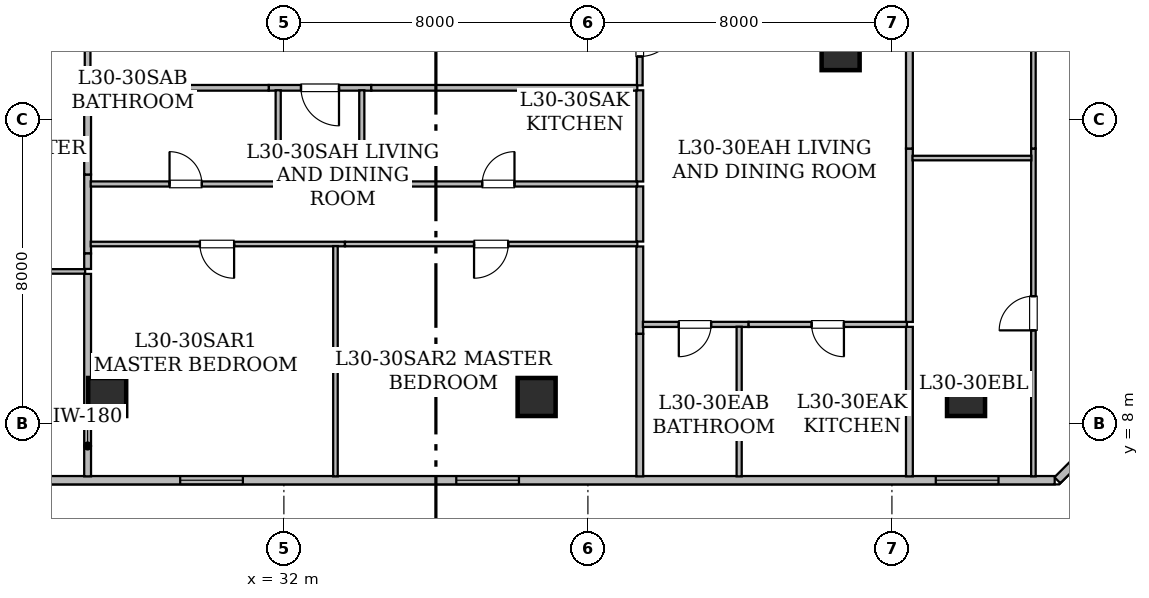
"""IFC4 building model, lengths in metres.
Left out: names, types, materials, properties, quantities, classifications, styles, units other than length and angle.
Written with IfcOpenShell. Run it as: python <this file> out.ifc"""

import sys

from ifc_helpers import new_model, si_unit, direction, frame, frame_2d, origin, origin_2d, place, context, subcontext, project, spatial, rectangle, hollow_rectangle, extrude, element, fill, save


model = new_model("IFC4")
c1 = context("Model", 3, precision=1e-05, world=origin(), true_north=direction((0.0, 1.0)))
c2 = subcontext(c1, "Body", "Model", "MODEL_VIEW")
j1 = project(units=[si_unit("LENGTHUNIT", "METRE"), si_unit("PLANEANGLEUNIT", "RADIAN")], contexts=[c1])
p1 = place(None, origin())
s1 = spatial("IfcSite", under=j1, at=p1, CompositionType="ELEMENT")
p2 = place(p1, origin())
s2 = spatial("IfcBuilding", under=s1, at=p2, CompositionType="ELEMENT")
p3 = place(p2, frame((0.0, 0.0, 120.15)))
s3 = spatial("IfcBuildingStorey", under=s2, at=p3, CompositionType="ELEMENT", Elevation=120.15)
for number, where, z_axis, x_axis in (
    (1, (27.35, 8.7, 0.0), (0.0, 0.0, 1.0), (1.0, 0.0, 0.0)),
    (2, (38.65, 8.7, 0.0), (0.0, 0.0, 1.0), (1.0, 0.0, 0.0)),
    (3, (49.95, 8.7, 0.0), (0.0, 0.0, 1.0), (1.0, 0.0, 0.0)),
    (4, (46.65, 17.8, 0.0), (0.0, 0.0, 1.0), (1.0, 0.0, 0.0)),
):
    element("IfcColumn", number, at=place(p3, frame(where, z_axis=z_axis, x_axis=x_axis)), inside=s3, PredefinedType="COLUMN", context=c2, shape_type="SweptSolid", body=[
        extrude(hollow_rectangle(XDim=1.0, YDim=1.0, WallThickness=0.05, at=origin_2d()), origin(), (0.0, 0.0, 1.0), 3.65),
    ])
p4 = place(p3, frame((56.44, 10.596, 0.0), z_axis=(0.0, 0.0, 1.0), x_axis=(-0.707106781187, -0.707106781187, 0.0)))
e5 = element("IfcWall", 5, at=p4, inside=s3, PredefinedType="STANDARD", context=c2, shape_type="SweptSolid", body=[
    extrude(rectangle(XDim=5.778, YDim=0.22, at=frame_2d((2.889, 0.0))), origin(), (0.0, 0.0, 1.0), 3.43),
])
p5 = place(p3, frame((52.283, 6.51, 0.0), z_axis=(0.0, 0.0, 1.0), x_axis=(-1.0, 0.0, 0.0)))
e6 = element("IfcWall", 6, at=p5, inside=s3, PredefinedType="STANDARD", context=c2, shape_type="SweptSolid", body=[
    extrude(rectangle(XDim=38.568, YDim=0.22, at=frame_2d((19.284, 0.0))), origin(), (0.0, 0.0, 1.0), 3.43),
])
p6 = place(p5, frame((35.53, 0.0, 0.85)))
e7 = element("IfcOpeningElement", 7, at=p6, cuts=e6, PredefinedType="OPENING", context=c2, shape_type="SweptSolid", body=[
    extrude(rectangle(XDim=1.65, YDim=1.55, at=frame_2d((0.825, 0.775))), frame((0.0, 0.12, 0.0), z_axis=(0.0, -1.0, 0.0), x_axis=(1.0, 0.0, 0.0)), (0.0, 0.0, 1.0), 0.24),
])
p7 = place(p5, frame((28.578, 0.0, 0.85)))
e8 = element("IfcOpeningElement", 8, at=p7, cuts=e6, PredefinedType="OPENING", context=c2, shape_type="SweptSolid", body=[
    extrude(rectangle(XDim=1.65, YDim=1.55, at=frame_2d((0.825, 0.775))), frame((0.0, 0.12, 0.0), z_axis=(0.0, -1.0, 0.0), x_axis=(1.0, 0.0, 0.0)), (0.0, 0.0, 1.0), 0.24),
])
p8 = place(p5, frame((21.362, 0.0, 0.85)))
e9 = element("IfcOpeningElement", 9, at=p8, cuts=e6, PredefinedType="OPENING", context=c2, shape_type="SweptSolid", body=[
    extrude(rectangle(XDim=1.65, YDim=1.55, at=frame_2d((0.825, 0.775))), frame((0.0, 0.12, 0.0), z_axis=(0.0, -1.0, 0.0), x_axis=(1.0, 0.0, 0.0)), (0.0, 0.0, 1.0), 0.24),
])
p9 = place(p5, frame((14.097, 0.0, 0.85)))
e10 = element("IfcOpeningElement", 10, at=p9, cuts=e6, PredefinedType="OPENING", context=c2, shape_type="SweptSolid", body=[
    extrude(rectangle(XDim=1.65, YDim=1.55, at=frame_2d((0.825, 0.775))), frame((0.0, 0.12, 0.0), z_axis=(0.0, -1.0, 0.0), x_axis=(1.0, 0.0, 0.0)), (0.0, 0.0, 1.0), 0.24),
])
p10 = place(p5, frame((1.479, 0.0, 0.85)))
e11 = element("IfcOpeningElement", 11, at=p10, cuts=e6, PredefinedType="OPENING", context=c2, shape_type="SweptSolid", body=[
    extrude(rectangle(XDim=1.65, YDim=1.55, at=frame_2d((0.825, 0.775))), frame((0.0, 0.12, 0.0), z_axis=(0.0, -1.0, 0.0), x_axis=(1.0, 0.0, 0.0)), (0.0, 0.0, 1.0), 0.24),
])
p11 = place(p3, frame((26.835, 16.9, 0.0), z_axis=(0.0, 0.0, 1.0), x_axis=(0.0, 1.0, 0.0)))
e12 = element("IfcWall", 12, at=p11, inside=s3, PredefinedType="STANDARD", context=c2, shape_type="SweptSolid", body=[
    extrude(rectangle(XDim=1.254, YDim=0.15, at=frame_2d((0.627, 0.0))), origin(), (0.0, 0.0, 1.0), 3.43),
])
p12 = place(p3, frame((34.299, 16.835, 0.0), z_axis=(0.0, 0.0, 1.0), x_axis=(-1.0, 0.0, 0.0)))
e13 = element("IfcWall", 13, at=p12, inside=s3, PredefinedType="STANDARD", context=c2, shape_type="SweptSolid", body=[
    extrude(rectangle(XDim=2.698, YDim=0.15, at=frame_2d((1.349, 0.0))), origin(), (0.0, 0.0, 1.0), 3.43),
])
p13 = place(p12, frame((0.849, 0.0, 0.0)))
e14 = element("IfcOpeningElement", 14, at=p13, cuts=e13, PredefinedType="OPENING", context=c2, shape_type="SweptSolid", body=[
    extrude(rectangle(XDim=1.0, YDim=2.15, at=frame_2d((0.5, 1.075))), frame((0.0, 0.085, 0.0), z_axis=(0.0, -1.0, 0.0), x_axis=(1.0, 0.0, 0.0)), (0.0, 0.0, 1.0), 0.17),
])
p14 = place(p3, frame((31.601, 16.835, 0.0), z_axis=(0.0, 0.0, 1.0), x_axis=(-1.0, 0.0, 0.0)))
e15 = element("IfcWall", 15, at=p14, inside=s3, PredefinedType="STANDARD", context=c2, shape_type="SweptSolid", body=[
    extrude(rectangle(XDim=4.701, YDim=0.15, at=frame_2d((2.351, 0.0))), origin(), (0.0, 0.0, 1.0), 2.647),
])
p15 = place(p3, frame((41.3, 16.835, 0.0), z_axis=(0.0, 0.0, 1.0), x_axis=(-1.0, 0.0, 0.0)))
e16 = element("IfcWall", 16, at=p15, inside=s3, PredefinedType="STANDARD", context=c2, shape_type="SweptSolid", body=[
    extrude(rectangle(XDim=7.001, YDim=0.15, at=frame_2d((3.5, 0.0))), origin(), (0.0, 0.0, 1.0), 2.647),
])
p16 = place(p3, frame((41.365, 19.459, 0.0), z_axis=(0.0, 0.0, 1.0), x_axis=(0.0, -1.0, 0.0)))
e17 = element("IfcWall", 17, at=p16, inside=s3, PredefinedType="STANDARD", context=c2, shape_type="SweptSolid", body=[
    extrude(rectangle(XDim=2.559, YDim=0.15, at=frame_2d((1.28, 0.0))), origin(), (0.0, 0.0, 1.0), 2.647),
])
p17 = place(p16, frame((0.8, 0.0, 0.0)))
e18 = element("IfcOpeningElement", 18, at=p17, cuts=e17, PredefinedType="OPENING", context=c2, shape_type="SweptSolid", body=[
    extrude(rectangle(XDim=1.0, YDim=2.15, at=frame_2d((0.5, 1.075))), frame((0.0, 0.085, 0.0), z_axis=(0.0, -1.0, 0.0), x_axis=(1.0, 0.0, 0.0)), (0.0, 0.0, 1.0), 0.17),
])
p18 = place(p3, frame((18.979, 12.004, 0.0), z_axis=(0.0, 0.0, 1.0), x_axis=(1.0, 0.0, 0.0)))
e19 = element("IfcWall", 19, at=p18, inside=s3, PredefinedType="PARTITIONING", context=c2, shape_type="SweptSolid", body=[
    extrude(rectangle(XDim=7.791, YDim=0.12, at=frame_2d((3.896, 0.0))), origin(), (0.0, 0.0, 1.0), 3.43),
])
p19 = place(p3, frame((26.835, 11.939, 0.0), z_axis=(0.0, 0.0, 1.0), x_axis=(0.0, -1.0, 0.0)))
e20 = element("IfcWall", 20, at=p19, inside=s3, PredefinedType="STANDARD", context=c2, shape_type="SweptSolid", body=[
    extrude(rectangle(XDim=5.327, YDim=0.18, at=frame_2d((2.664, 0.0))), origin(), (0.0, 0.0, 1.0), 2.876),
])
p20 = place(p3, frame((26.835, 14.554, 0.0), z_axis=(0.0, 0.0, 1.0), x_axis=(0.0, -1.0, 0.0)))
e21 = element("IfcWall", 21, at=p20, inside=s3, PredefinedType="STANDARD", context=c2, shape_type="SweptSolid", body=[
    extrude(rectangle(XDim=2.078, YDim=0.18, at=frame_2d((1.039, 0.0))), origin(), (0.0, 0.0, 1.0), 3.43),
])
p21 = place(p3, frame((26.835, 16.9, 0.0), z_axis=(0.0, 0.0, 1.0), x_axis=(0.0, -1.0, 0.0)))
e22 = element("IfcWall", 22, at=p21, inside=s3, PredefinedType="STANDARD", context=c2, shape_type="SweptSolid", body=[
    extrude(rectangle(XDim=2.346, YDim=0.18, at=frame_2d((1.173, 0.0))), origin(), (0.0, 0.0, 1.0), 3.43),
])
p22 = place(p3, frame((26.835, 12.476, 0.0), z_axis=(0.0, 0.0, 1.0), x_axis=(0.0, -1.0, 0.0)))
e23 = element("IfcWall", 23, at=p22, inside=s3, PredefinedType="STANDARD", context=c2, shape_type="SweptSolid", body=[
    extrude(rectangle(XDim=0.407, YDim=0.18, at=frame_2d((0.204, 0.0))), origin(), (0.0, 0.0, 1.0), 3.43),
])
p23 = place(p3, frame((26.917, 14.305, 0.0), z_axis=(0.0, 0.0, 1.0), x_axis=(1.0, 0.0, 0.0)))
e24 = element("IfcWall", 24, at=p23, inside=s3, PredefinedType="PARTITIONING", context=c2, shape_type="SweptSolid", body=[
    extrude(rectangle(XDim=4.998, YDim=0.135, at=frame_2d((2.499, 0.0))), origin(), (0.0, 0.0, 1.0), 2.647),
])
p24 = place(p23, frame((2.074, 0.0, 0.0)))
e25 = element("IfcOpeningElement", 25, at=p24, cuts=e24, PredefinedType="OPENING", context=c2, shape_type="SweptSolid", body=[
    extrude(rectangle(XDim=0.85, YDim=2.1, at=frame_2d((0.425, 1.05))), frame((0.0, 0.077, 0.0), z_axis=(0.0, -1.0, 0.0), x_axis=(1.0, 0.0, 0.0)), (0.0, 0.0, 1.0), 0.155),
])
for number, where, z_axis, x_axis in (
    (26, (31.85, 14.24, 0.0), (0.0, 0.0, 1.0), (0.0, 1.0, 0.0)),
    (27, (34.05, 16.77, 0.0), (0.0, 0.0, 1.0), (0.0, -1.0, 0.0)),
):
    element("IfcWall", number, at=place(p3, frame(where, z_axis=z_axis, x_axis=x_axis)), inside=s3, PredefinedType="PARTITIONING", context=c2, shape_type="SweptSolid", body=[
        extrude(rectangle(XDim=2.53, YDim=0.135, at=frame_2d((1.265, 0.0))), origin(), (0.0, 0.0, 1.0), 3.43),
    ])
p25 = place(p3, frame((33.985, 14.305, 0.0), z_axis=(0.0, 0.0, 1.0), x_axis=(1.0, 0.0, 0.0)))
e28 = element("IfcWall", 28, at=p25, inside=s3, PredefinedType="PARTITIONING", context=c2, shape_type="SweptSolid", body=[
    extrude(rectangle(XDim=7.315, YDim=0.135, at=frame_2d((3.657, 0.0))), origin(), (0.0, 0.0, 1.0), 2.647),
])
p26 = place(p25, frame((3.233, 0.0, 0.0)))
e29 = element("IfcOpeningElement", 29, at=p26, cuts=e28, PredefinedType="OPENING", context=c2, shape_type="SweptSolid", body=[
    extrude(rectangle(XDim=0.85, YDim=2.1, at=frame_2d((0.425, 1.05))), frame((0.0, 0.077, 0.0), z_axis=(0.0, -1.0, 0.0), x_axis=(1.0, 0.0, 0.0)), (0.0, 0.0, 1.0), 0.155),
])
p27 = place(p3, frame((33.607, 12.725, 0.0), z_axis=(0.0, 0.0, 1.0), x_axis=(-1.0, 0.0, 0.0)))
e30 = element("IfcWall", 30, at=p27, inside=s3, PredefinedType="PARTITIONING", context=c2, shape_type="SweptSolid", body=[
    extrude(rectangle(XDim=6.69, YDim=0.12, at=frame_2d((3.345, 0.0))), origin(), (0.0, 0.0, 1.0), 2.647),
])
p28 = place(p27, frame((2.917, 0.0, 0.0)))
e31 = element("IfcOpeningElement", 31, at=p28, cuts=e30, PredefinedType="OPENING", context=c2, shape_type="SweptSolid", body=[
    extrude(rectangle(XDim=0.9, YDim=2.1, at=frame_2d((0.45, 1.05))), frame((0.0, 0.07, 0.0), z_axis=(0.0, -1.0, 0.0), x_axis=(1.0, 0.0, 0.0)), (0.0, 0.0, 1.0), 0.14),
])
p29 = place(p3, frame((41.3, 12.725, 0.0), z_axis=(0.0, 0.0, 1.0), x_axis=(-1.0, 0.0, 0.0)))
e32 = element("IfcWall", 32, at=p29, inside=s3, PredefinedType="PARTITIONING", context=c2, shape_type="SweptSolid", body=[
    extrude(rectangle(XDim=7.693, YDim=0.12, at=frame_2d((3.847, 0.0))), origin(), (0.0, 0.0, 1.0), 2.647),
])
p30 = place(p29, frame((3.396, 0.0, 0.0)))
e33 = element("IfcOpeningElement", 33, at=p30, cuts=e32, PredefinedType="OPENING", context=c2, shape_type="SweptSolid", body=[
    extrude(rectangle(XDim=0.9, YDim=2.1, at=frame_2d((0.45, 1.05))), frame((0.0, 0.07, 0.0), z_axis=(0.0, -1.0, 0.0), x_axis=(1.0, 0.0, 0.0)), (0.0, 0.0, 1.0), 0.14),
])
p31 = place(p3, frame((41.365, 14.24, 0.0), z_axis=(0.0, 0.0, 1.0), x_axis=(0.0, -1.0, 0.0)))
e34 = element("IfcWall", 34, at=p31, inside=s3, PredefinedType="STANDARD", context=c2, shape_type="SweptSolid", body=[
    extrude(rectangle(XDim=1.45, YDim=0.18, at=frame_2d((0.725, 0.0))), origin(), (0.0, 0.0, 1.0), 3.43),
])
p32 = place(p3, frame((41.365, 16.77, 0.0), z_axis=(0.0, 0.0, 1.0), x_axis=(0.0, -1.0, 0.0)))
e35 = element("IfcWall", 35, at=p32, inside=s3, PredefinedType="STANDARD", context=c2, shape_type="SweptSolid", body=[
    extrude(rectangle(XDim=2.4, YDim=0.18, at=frame_2d((1.2, 0.0))), origin(), (0.0, 0.0, 1.0), 3.43),
])
p33 = place(p3, frame((33.357, 12.671, 0.0), z_axis=(0.0, 0.0, 1.0), x_axis=(0.0, -1.0, 0.0)))
e36 = element("IfcWall", 36, at=p33, inside=s3, PredefinedType="PARTITIONING", context=c2, shape_type="SweptSolid", body=[
    extrude(rectangle(XDim=6.059, YDim=0.12, at=frame_2d((3.029, 0.0))), origin(), (0.0, 0.0, 1.0), 2.876),
])
p34 = place(p3, frame((41.365, 12.66, 0.0), z_axis=(0.0, 0.0, 1.0), x_axis=(0.0, -1.0, 0.0)))
e37 = element("IfcWall", 37, at=p34, inside=s3, PredefinedType="STANDARD", context=c2, shape_type="SweptSolid", body=[
    extrude(rectangle(XDim=2.299, YDim=0.18, at=frame_2d((1.149, 0.0))), origin(), (0.0, 0.0, 1.0), 3.43),
])
p35 = place(p3, frame((41.365, 10.361, 0.0), z_axis=(0.0, 0.0, 1.0), x_axis=(0.0, -1.0, 0.0)))
e38 = element("IfcWall", 38, at=p35, inside=s3, PredefinedType="STANDARD", context=c2, shape_type="SweptSolid", body=[
    extrude(rectangle(XDim=3.749, YDim=0.18, at=frame_2d((1.875, 0.0))), origin(), (0.0, 0.0, 1.0), 2.876),
])
p36 = place(p3, frame((44.229, 10.61, 0.0), z_axis=(0.0, 0.0, 1.0), x_axis=(-1.0, 0.0, 0.0)))
e39 = element("IfcWall", 39, at=p36, inside=s3, PredefinedType="PARTITIONING", context=c2, shape_type="SweptSolid", body=[
    extrude(rectangle(XDim=2.782, YDim=0.135, at=frame_2d((1.391, 0.0))), origin(), (0.0, 0.0, 1.0), 3.43),
])
p37 = place(p36, frame((0.987, 0.0, 0.0)))
e40 = element("IfcOpeningElement", 40, at=p37, cuts=e39, PredefinedType="OPENING", context=c2, shape_type="SweptSolid", body=[
    extrude(rectangle(XDim=0.85, YDim=2.1, at=frame_2d((0.425, 1.05))), frame((0.0, 0.077, 0.0), z_axis=(0.0, -1.0, 0.0), x_axis=(1.0, 0.0, 0.0)), (0.0, 0.0, 1.0), 0.155),
])
p38 = place(p3, frame((48.395, 10.61, 0.0), z_axis=(0.0, 0.0, 1.0), x_axis=(-1.0, 0.0, 0.0)))
e41 = element("IfcWall", 41, at=p38, inside=s3, PredefinedType="PARTITIONING", context=c2, shape_type="SweptSolid", body=[
    extrude(rectangle(XDim=4.166, YDim=0.135, at=frame_2d((2.083, 0.0))), origin(), (0.0, 0.0, 1.0), 3.43),
])
p39 = place(p38, frame((1.658, 0.0, 0.0)))
e42 = element("IfcOpeningElement", 42, at=p39, cuts=e41, PredefinedType="OPENING", context=c2, shape_type="SweptSolid", body=[
    extrude(rectangle(XDim=0.85, YDim=2.1, at=frame_2d((0.425, 1.05))), frame((0.0, 0.077, 0.0), z_axis=(0.0, -1.0, 0.0), x_axis=(1.0, 0.0, 0.0)), (0.0, 0.0, 1.0), 0.155),
])
p40 = place(p3, frame((48.46, 15.237, 0.0), z_axis=(0.0, 0.0, 1.0), x_axis=(0.0, -1.0, 0.0)))
e43 = element("IfcWall", 43, at=p40, inside=s3, PredefinedType="STANDARD", context=c2, shape_type="SweptSolid", body=[
    extrude(rectangle(XDim=4.562, YDim=0.18, at=frame_2d((2.281, 0.0))), origin(), (0.0, 0.0, 1.0), 2.647),
])
p41 = place(p3, frame((48.46, 19.145, 0.0), z_axis=(0.0, 0.0, 1.0), x_axis=(0.0, -1.0, 0.0)))
e44 = element("IfcWall", 44, at=p41, inside=s3, PredefinedType="STANDARD", context=c2, shape_type="SweptSolid", body=[
    extrude(rectangle(XDim=3.908, YDim=0.18, at=frame_2d((1.954, 0.0))), origin(), (0.0, 0.0, 1.0), 2.687),
])
p42 = place(p3, frame((43.98, 10.548, 0.0), z_axis=(0.0, 0.0, 1.0), x_axis=(0.0, -1.0, 0.0)))
e45 = element("IfcWall", 45, at=p42, inside=s3, PredefinedType="PARTITIONING", context=c2, shape_type="SweptSolid", body=[
    extrude(rectangle(XDim=3.936, YDim=0.135, at=frame_2d((1.968, 0.0))), origin(), (0.0, 0.0, 1.0), 2.876),
])
p43 = place(p3, frame((48.46, 10.545, 0.0), z_axis=(0.0, 0.0, 1.0), x_axis=(0.0, -1.0, 0.0)))
e46 = element("IfcWall", 46, at=p43, inside=s3, PredefinedType="STANDARD", context=c2, shape_type="SweptSolid", body=[
    extrude(rectangle(XDim=3.933, YDim=0.18, at=frame_2d((1.966, 0.0))), origin(), (0.0, 0.0, 1.0), 2.876),
])
p44 = place(p3, frame((51.723, 6.612, 0.0), z_axis=(0.0, 0.0, 1.0), x_axis=(0.0, 1.0, 0.0)))
e47 = element("IfcWall", 47, at=p44, inside=s3, PredefinedType="PARTITIONING", context=c2, shape_type="SweptSolid", body=[
    extrude(rectangle(XDim=8.625, YDim=0.12, at=frame_2d((4.312, 0.0))), origin(), (0.0, 0.0, 1.0), 2.876),
])
p45 = place(p44, frame((3.841, 0.0, 0.0)))
e48 = element("IfcOpeningElement", 48, at=p45, cuts=e47, PredefinedType="OPENING", context=c2, shape_type="SweptSolid", body=[
    extrude(rectangle(XDim=0.9, YDim=2.1, at=frame_2d((0.45, 1.05))), frame((0.0, 0.07, 0.0), z_axis=(0.0, -1.0, 0.0), x_axis=(1.0, 0.0, 0.0)), (0.0, 0.0, 1.0), 0.14),
])
p46 = place(p3, frame((51.723, 15.237, 0.0), z_axis=(0.0, 0.0, 1.0), x_axis=(0.0, 1.0, 0.0)))
e49 = element("IfcWall", 49, at=p46, inside=s3, PredefinedType="PARTITIONING", context=c2, shape_type="SweptSolid", body=[
    extrude(rectangle(XDim=9.653, YDim=0.12, at=frame_2d((4.826, 0.0))), origin(), (0.0, 0.0, 1.0), 2.687),
])
p47 = place(p46, frame((4.377, 0.0, 0.0)))
e50 = element("IfcOpeningElement", 50, at=p47, cuts=e49, PredefinedType="OPENING", context=c2, shape_type="SweptSolid", body=[
    extrude(rectangle(XDim=0.9, YDim=2.1, at=frame_2d((0.45, 1.05))), frame((0.0, 0.07, 0.0), z_axis=(0.0, -1.0, 0.0), x_axis=(1.0, 0.0, 0.0)), (0.0, 0.0, 1.0), 0.14),
])
p48 = place(p3, frame((48.542, 14.987, 0.0), z_axis=(0.0, 0.0, 1.0), x_axis=(1.0, 0.0, 0.0)))
e51 = element("IfcWall", 51, at=p48, inside=s3, PredefinedType="PARTITIONING", context=c2, shape_type="SweptSolid", body=[
    extrude(rectangle(XDim=3.127, YDim=0.12, at=frame_2d((1.563, 0.0))), origin(), (0.0, 0.0, 1.0), 3.43),
])
p49 = place(p8, origin())
e52 = element("IfcWindow", 52, at=p49, inside=s3, PartitioningType="SINGLE_PANEL", PredefinedType="WINDOW", context=c2, shape_type="SweptSolid", body=[
    extrude(rectangle(XDim=1.65, YDim=1.55, at=frame_2d((0.825, 0.775))), frame((0.0, 0.03, 0.0), z_axis=(0.0, -1.0, 0.0), x_axis=(1.0, 0.0, 0.0)), (0.0, 0.0, 1.0), 0.06),
])
fill(e9, e52)
p50 = place(p9, origin())
e53 = element("IfcWindow", 53, at=p50, inside=s3, PartitioningType="SINGLE_PANEL", PredefinedType="WINDOW", context=c2, shape_type="SweptSolid", body=[
    extrude(rectangle(XDim=1.65, YDim=1.55, at=frame_2d((0.825, 0.775))), frame((0.0, 0.03, 0.0), z_axis=(0.0, -1.0, 0.0), x_axis=(1.0, 0.0, 0.0)), (0.0, 0.0, 1.0), 0.06),
])
fill(e10, e53)
p51 = place(p10, origin())
e54 = element("IfcWindow", 54, at=p51, inside=s3, PartitioningType="SINGLE_PANEL", PredefinedType="WINDOW", context=c2, shape_type="SweptSolid", body=[
    extrude(rectangle(XDim=1.65, YDim=1.55, at=frame_2d((0.825, 0.775))), frame((0.0, 0.03, 0.0), z_axis=(0.0, -1.0, 0.0), x_axis=(1.0, 0.0, 0.0)), (0.0, 0.0, 1.0), 0.06),
])
fill(e11, e54)
p52 = place(p13, origin())
e55 = element("IfcDoor", 55, at=p52, inside=s3, OperationType="SINGLE_SWING_LEFT", PredefinedType="DOOR", context=c2, shape_type="SweptSolid", body=[
    extrude(rectangle(XDim=1.0, YDim=2.15, at=frame_2d((0.5, 1.075))), frame((0.0, 0.025, 0.0), z_axis=(0.0, -1.0, 0.0), x_axis=(1.0, 0.0, 0.0)), (0.0, 0.0, 1.0), 0.05),
])
fill(e14, e55)
p53 = place(p17, origin())
e56 = element("IfcDoor", 56, at=p53, inside=s3, OperationType="SINGLE_SWING_LEFT", PredefinedType="DOOR", context=c2, shape_type="SweptSolid", body=[
    extrude(rectangle(XDim=1.0, YDim=2.15, at=frame_2d((0.5, 1.075))), frame((0.0, 0.025, 0.0), z_axis=(0.0, -1.0, 0.0), x_axis=(1.0, 0.0, 0.0)), (0.0, 0.0, 1.0), 0.05),
])
fill(e18, e56)
p54 = place(p24, origin())
e57 = element("IfcDoor", 57, at=p54, inside=s3, OperationType="SINGLE_SWING_LEFT", PredefinedType="DOOR", context=c2, shape_type="SweptSolid", body=[
    extrude(rectangle(XDim=0.85, YDim=2.1, at=frame_2d((0.425, 1.05))), frame((0.0, 0.025, 0.0), z_axis=(0.0, -1.0, 0.0), x_axis=(1.0, 0.0, 0.0)), (0.0, 0.0, 1.0), 0.05),
])
fill(e25, e57)
p55 = place(p26, origin())
e58 = element("IfcDoor", 58, at=p55, inside=s3, OperationType="SINGLE_SWING_RIGHT", PredefinedType="DOOR", context=c2, shape_type="SweptSolid", body=[
    extrude(rectangle(XDim=0.85, YDim=2.1, at=frame_2d((0.425, 1.05))), frame((0.0, 0.025, 0.0), z_axis=(0.0, -1.0, 0.0), x_axis=(1.0, 0.0, 0.0)), (0.0, 0.0, 1.0), 0.05),
])
fill(e29, e58)
p56 = place(p28, origin())
e59 = element("IfcDoor", 59, at=p56, inside=s3, OperationType="SINGLE_SWING_LEFT", PredefinedType="DOOR", context=c2, shape_type="SweptSolid", body=[
    extrude(rectangle(XDim=0.9, YDim=2.1, at=frame_2d((0.45, 1.05))), frame((0.0, 0.025, 0.0), z_axis=(0.0, -1.0, 0.0), x_axis=(1.0, 0.0, 0.0)), (0.0, 0.0, 1.0), 0.05),
])
fill(e31, e59)
p57 = place(p30, origin())
e60 = element("IfcDoor", 60, at=p57, inside=s3, OperationType="SINGLE_SWING_RIGHT", PredefinedType="DOOR", context=c2, shape_type="SweptSolid", body=[
    extrude(rectangle(XDim=0.9, YDim=2.1, at=frame_2d((0.45, 1.05))), frame((0.0, 0.025, 0.0), z_axis=(0.0, -1.0, 0.0), x_axis=(1.0, 0.0, 0.0)), (0.0, 0.0, 1.0), 0.05),
])
fill(e33, e60)
p58 = place(p37, origin())
e61 = element("IfcDoor", 61, at=p58, inside=s3, OperationType="SINGLE_SWING_RIGHT", PredefinedType="DOOR", context=c2, shape_type="SweptSolid", body=[
    extrude(rectangle(XDim=0.85, YDim=2.1, at=frame_2d((0.425, 1.05))), frame((0.0, 0.025, 0.0), z_axis=(0.0, -1.0, 0.0), x_axis=(1.0, 0.0, 0.0)), (0.0, 0.0, 1.0), 0.05),
])
fill(e40, e61)
p59 = place(p39, origin())
e62 = element("IfcDoor", 62, at=p59, inside=s3, OperationType="SINGLE_SWING_LEFT", PredefinedType="DOOR", context=c2, shape_type="SweptSolid", body=[
    extrude(rectangle(XDim=0.85, YDim=2.1, at=frame_2d((0.425, 1.05))), frame((0.0, 0.025, 0.0), z_axis=(0.0, -1.0, 0.0), x_axis=(1.0, 0.0, 0.0)), (0.0, 0.0, 1.0), 0.05),
])
fill(e42, e62)
p60 = place(p45, origin())
e63 = element("IfcDoor", 63, at=p60, inside=s3, OperationType="SINGLE_SWING_LEFT", PredefinedType="DOOR", context=c2, shape_type="SweptSolid", body=[
    extrude(rectangle(XDim=0.9, YDim=2.1, at=frame_2d((0.45, 1.05))), frame((0.0, 0.025, 0.0), z_axis=(0.0, -1.0, 0.0), x_axis=(1.0, 0.0, 0.0)), (0.0, 0.0, 1.0), 0.05),
])
fill(e48, e63)
save(model, sys.argv[1])
